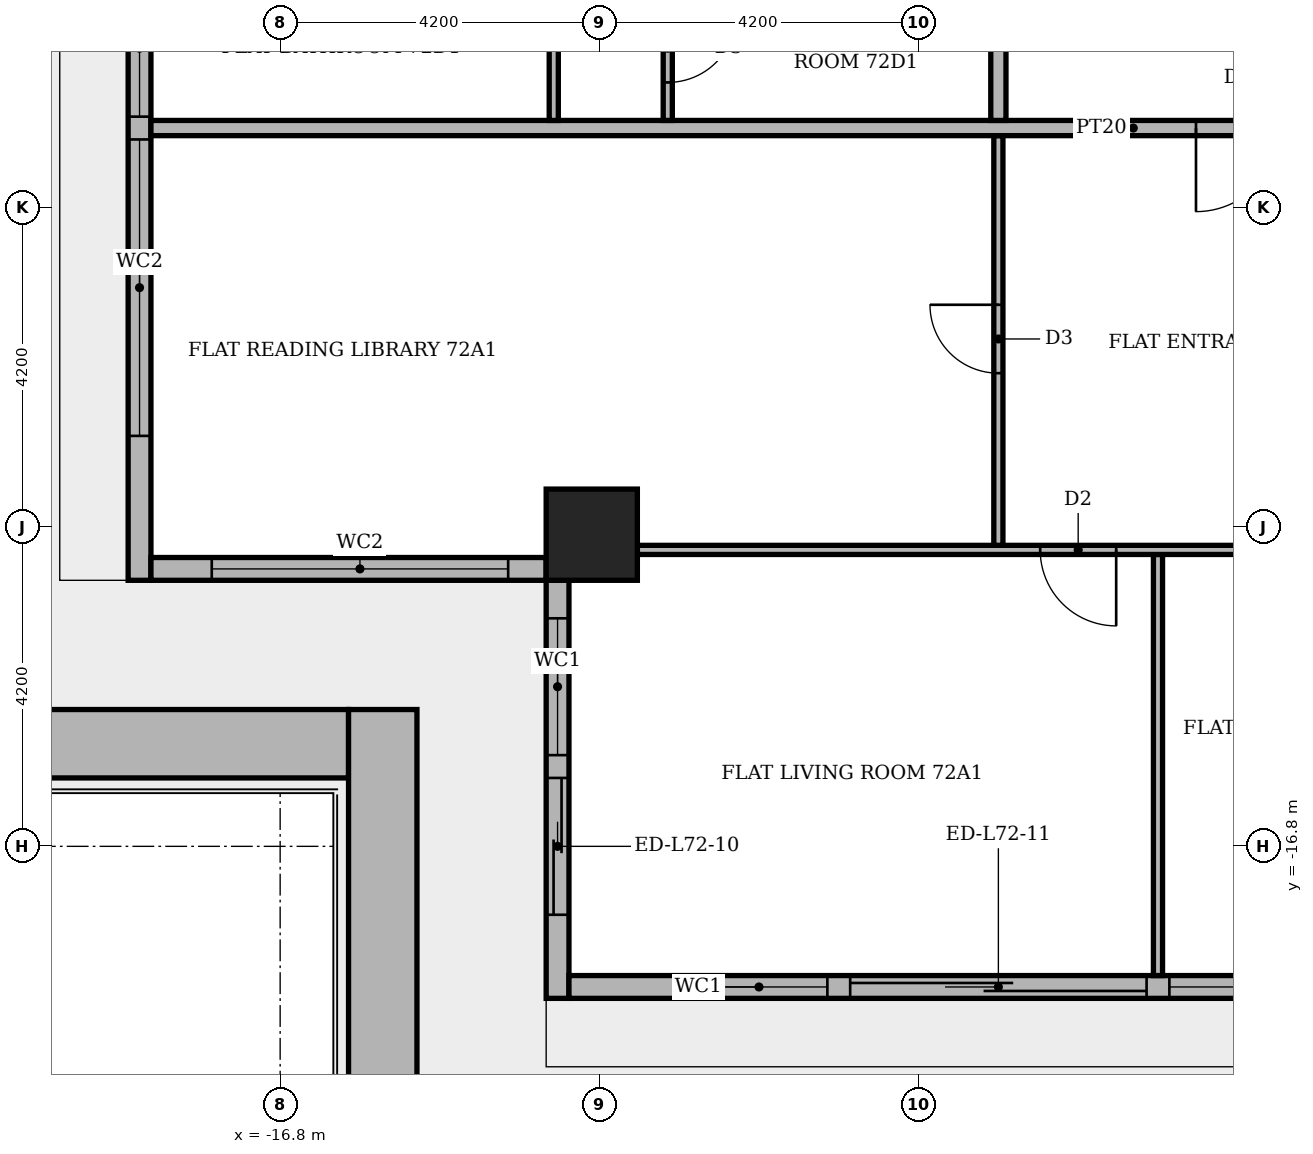
"""IFC4 building model, lengths in metres.
Left out: names, types, materials, properties, quantities, classifications, styles, units other than length and angle.
Written with IfcOpenShell. Run it as: python <this file> out.ifc"""

import sys

from ifc_helpers import new_model, si_unit, direction, frame, frame_2d, origin, origin_2d, place, context, subcontext, project, spatial, rectangle, extrude, element, fill, save


model = new_model("IFC4")
c1 = context("Model", 3, precision=1e-05, world=origin(), true_north=direction((0.0, 1.0)))
c2 = subcontext(c1, "Body", "Model", "MODEL_VIEW")
j1 = project(units=[si_unit("LENGTHUNIT", "METRE"), si_unit("PLANEANGLEUNIT", "RADIAN")], contexts=[c1])
p1 = place(None, origin())
s1 = spatial("IfcSite", under=j1, at=p1, CompositionType="ELEMENT")
p2 = place(p1, origin())
s2 = spatial("IfcBuilding", under=s1, at=p2, CompositionType="ELEMENT")
p3 = place(p2, frame((0.0, 0.0, 300.6)))
s3 = spatial("IfcBuildingStorey", under=s2, at=p3, CompositionType="ELEMENT", Elevation=300.6)
p4 = place(p3, frame((-12.7, -12.7, -0.35), z_axis=(0.0, 0.0, 1.0), x_axis=(1.0, 0.0, 0.0)))
e1 = element("IfcColumn", 1, at=p4, inside=s3, PredefinedType="COLUMN", context=c2, shape_type="SweptSolid", body=[
    extrude(rectangle(XDim=1.2, YDim=1.2, at=origin_2d()), origin(), (0.0, 0.0, 1.0), 4.25),
])
p5 = place(p3, frame((-18.65, 13.0, 0.0), z_axis=(0.0, 0.0, 1.0), x_axis=(0.0, -1.0, 0.0)))
e2 = element("IfcWall", 2, at=p5, inside=s3, PredefinedType="STANDARD", context=c2, shape_type="SweptSolid", body=[
    extrude(rectangle(XDim=26.3, YDim=0.3, at=frame_2d((13.15, 0.0))), origin(), (0.0, 0.0, 1.0), 3.55),
])
p6 = place(p5, frame((1.6, 0.0, 0.0)))
e3 = element("IfcOpeningElement", 3, at=p6, cuts=e2, PredefinedType="OPENING", context=c2, shape_type="SweptSolid", body=[
    extrude(rectangle(XDim=1.8, YDim=2.4, at=frame_2d((0.9, 1.2))), frame((0.0, 0.16, 0.0), z_axis=(0.0, -1.0, 0.0), x_axis=(1.0, 0.0, 0.0)), (0.0, 0.0, 1.0), 0.32),
])
p7 = place(p5, frame((3.7, 0.0, 0.6)))
e4 = element("IfcOpeningElement", 4, at=p7, cuts=e2, PredefinedType="OPENING", context=c2, shape_type="SweptSolid", body=[
    extrude(rectangle(XDim=1.8, YDim=2.4, at=frame_2d((0.9, 1.2))), frame((0.0, 0.16, 0.0), z_axis=(0.0, -1.0, 0.0), x_axis=(1.0, 0.0, 0.0)), (0.0, 0.0, 1.0), 0.32),
])
p8 = place(p5, frame((5.8, 0.0, 0.6)))
e5 = element("IfcOpeningElement", 5, at=p8, cuts=e2, PredefinedType="OPENING", context=c2, shape_type="SweptSolid", body=[
    extrude(rectangle(XDim=1.8, YDim=2.4, at=frame_2d((0.9, 1.2))), frame((0.0, 0.16, 0.0), z_axis=(0.0, -1.0, 0.0), x_axis=(1.0, 0.0, 0.0)), (0.0, 0.0, 1.0), 0.32),
])
p9 = place(p5, frame((7.9, 0.0, 0.0)))
e6 = element("IfcOpeningElement", 6, at=p9, cuts=e2, PredefinedType="OPENING", context=c2, shape_type="SweptSolid", body=[
    extrude(rectangle(XDim=1.8, YDim=2.4, at=frame_2d((0.9, 1.2))), frame((0.0, 0.16, 0.0), z_axis=(0.0, -1.0, 0.0), x_axis=(1.0, 0.0, 0.0)), (0.0, 0.0, 1.0), 0.32),
])
p10 = place(p5, frame((10.0, 0.0, 0.6)))
e7 = element("IfcOpeningElement", 7, at=p10, cuts=e2, PredefinedType="OPENING", context=c2, shape_type="SweptSolid", body=[
    extrude(rectangle(XDim=1.8, YDim=2.4, at=frame_2d((0.9, 1.2))), frame((0.0, 0.16, 0.0), z_axis=(0.0, -1.0, 0.0), x_axis=(1.0, 0.0, 0.0)), (0.0, 0.0, 1.0), 0.32),
])
p11 = place(p5, frame((12.1, 0.0, 0.6)))
e8 = element("IfcOpeningElement", 8, at=p11, cuts=e2, PredefinedType="OPENING", context=c2, shape_type="SweptSolid", body=[
    extrude(rectangle(XDim=1.8, YDim=2.4, at=frame_2d((0.9, 1.2))), frame((0.0, 0.16, 0.0), z_axis=(0.0, -1.0, 0.0), x_axis=(1.0, 0.0, 0.0)), (0.0, 0.0, 1.0), 0.32),
])
p12 = place(p5, frame((14.2, 0.0, 0.6)))
e9 = element("IfcOpeningElement", 9, at=p12, cuts=e2, PredefinedType="OPENING", context=c2, shape_type="SweptSolid", body=[
    extrude(rectangle(XDim=3.9, YDim=2.4, at=frame_2d((1.95, 1.2))), frame((0.0, 0.16, 0.0), z_axis=(0.0, -1.0, 0.0), x_axis=(1.0, 0.0, 0.0)), (0.0, 0.0, 1.0), 0.32),
])
p13 = place(p5, frame((18.4, 0.0, 0.6)))
e10 = element("IfcOpeningElement", 10, at=p13, cuts=e2, PredefinedType="OPENING", context=c2, shape_type="SweptSolid", body=[
    extrude(rectangle(XDim=1.8, YDim=2.4, at=frame_2d((0.9, 1.2))), frame((0.0, 0.16, 0.0), z_axis=(0.0, -1.0, 0.0), x_axis=(1.0, 0.0, 0.0)), (0.0, 0.0, 1.0), 0.32),
])
p14 = place(p5, frame((20.5, 0.0, 0.6)))
e11 = element("IfcOpeningElement", 11, at=p14, cuts=e2, PredefinedType="OPENING", context=c2, shape_type="SweptSolid", body=[
    extrude(rectangle(XDim=3.9, YDim=2.4, at=frame_2d((1.95, 1.2))), frame((0.0, 0.16, 0.0), z_axis=(0.0, -1.0, 0.0), x_axis=(1.0, 0.0, 0.0)), (0.0, 0.0, 1.0), 0.32),
])
p15 = place(p3, frame((-18.5, -13.15, 0.0), z_axis=(0.0, 0.0, 1.0), x_axis=(1.0, 0.0, 0.0)))
e12 = element("IfcWall", 12, at=p15, inside=s3, PredefinedType="STANDARD", context=c2, shape_type="SweptSolid", body=[
    extrude(rectangle(XDim=5.2, YDim=0.3, at=frame_2d((2.6, 0.0))), origin(), (0.0, 0.0, 1.0), 3.55),
])
p16 = place(p15, frame((0.8, 0.0, 0.6)))
e13 = element("IfcOpeningElement", 13, at=p16, cuts=e12, PredefinedType="OPENING", context=c2, shape_type="SweptSolid", body=[
    extrude(rectangle(XDim=3.9, YDim=2.4, at=frame_2d((1.95, 1.2))), frame((0.0, 0.16, 0.0), z_axis=(0.0, -1.0, 0.0), x_axis=(1.0, 0.0, 0.0)), (0.0, 0.0, 1.0), 0.32),
])
p17 = place(p3, frame((-13.15, -13.3, 0.0), z_axis=(0.0, 0.0, 1.0), x_axis=(0.0, -1.0, 0.0)))
e14 = element("IfcWall", 14, at=p17, inside=s3, PredefinedType="STANDARD", context=c2, shape_type="SweptSolid", body=[
    extrude(rectangle(XDim=5.5, YDim=0.3, at=frame_2d((2.75, 0.0))), origin(), (0.0, 0.0, 1.0), 3.55),
])
p18 = place(p17, frame((0.5, 0.0, 0.6)))
e15 = element("IfcOpeningElement", 15, at=p18, cuts=e14, PredefinedType="OPENING", context=c2, shape_type="SweptSolid", body=[
    extrude(rectangle(XDim=1.8, YDim=2.4, at=frame_2d((0.9, 1.2))), frame((0.0, 0.16, 0.0), z_axis=(0.0, -1.0, 0.0), x_axis=(1.0, 0.0, 0.0)), (0.0, 0.0, 1.0), 0.32),
])
p19 = place(p17, frame((2.6, 0.0, 0.0)))
e16 = element("IfcOpeningElement", 16, at=p19, cuts=e14, PredefinedType="OPENING", context=c2, shape_type="SweptSolid", body=[
    extrude(rectangle(XDim=1.8, YDim=2.4, at=frame_2d((0.9, 1.2))), frame((0.0, 0.16, 0.0), z_axis=(0.0, -1.0, 0.0), x_axis=(1.0, 0.0, 0.0)), (0.0, 0.0, 1.0), 0.32),
])
p20 = place(p3, frame((-13.0, -18.65, 0.0), z_axis=(0.0, 0.0, 1.0), x_axis=(1.0, 0.0, 0.0)))
e17 = element("IfcWall", 17, at=p20, inside=s3, PredefinedType="STANDARD", context=c2, shape_type="SweptSolid", body=[
    extrude(rectangle(XDim=26.3, YDim=0.3, at=frame_2d((13.15, 0.0))), origin(), (0.0, 0.0, 1.0), 3.55),
])
p21 = place(p20, frame((1.6, 0.0, 0.6)))
e18 = element("IfcOpeningElement", 18, at=p21, cuts=e17, PredefinedType="OPENING", context=c2, shape_type="SweptSolid", body=[
    extrude(rectangle(XDim=1.8, YDim=2.4, at=frame_2d((0.9, 1.2))), frame((0.0, 0.16, 0.0), z_axis=(0.0, -1.0, 0.0), x_axis=(1.0, 0.0, 0.0)), (0.0, 0.0, 1.0), 0.32),
])
p22 = place(p20, frame((3.7, 0.0, 0.0)))
e19 = element("IfcOpeningElement", 19, at=p22, cuts=e17, PredefinedType="OPENING", context=c2, shape_type="SweptSolid", body=[
    extrude(rectangle(XDim=3.9, YDim=2.4, at=frame_2d((1.95, 1.2))), frame((0.0, 0.16, 0.0), z_axis=(0.0, -1.0, 0.0), x_axis=(1.0, 0.0, 0.0)), (0.0, 0.0, 1.0), 0.32),
])
p23 = place(p20, frame((7.9, 0.0, 0.6)))
e20 = element("IfcOpeningElement", 20, at=p23, cuts=e17, PredefinedType="OPENING", context=c2, shape_type="SweptSolid", body=[
    extrude(rectangle(XDim=1.8, YDim=2.4, at=frame_2d((0.9, 1.2))), frame((0.0, 0.16, 0.0), z_axis=(0.0, -1.0, 0.0), x_axis=(1.0, 0.0, 0.0)), (0.0, 0.0, 1.0), 0.32),
])
p24 = place(p20, frame((10.0, 0.0, 0.0)))
e21 = element("IfcOpeningElement", 21, at=p24, cuts=e17, PredefinedType="OPENING", context=c2, shape_type="SweptSolid", body=[
    extrude(rectangle(XDim=1.8, YDim=2.4, at=frame_2d((0.9, 1.2))), frame((0.0, 0.16, 0.0), z_axis=(0.0, -1.0, 0.0), x_axis=(1.0, 0.0, 0.0)), (0.0, 0.0, 1.0), 0.32),
])
p25 = place(p20, frame((12.1, 0.0, 0.6)))
e22 = element("IfcOpeningElement", 22, at=p25, cuts=e17, PredefinedType="OPENING", context=c2, shape_type="SweptSolid", body=[
    extrude(rectangle(XDim=3.9, YDim=2.4, at=frame_2d((1.95, 1.2))), frame((0.0, 0.16, 0.0), z_axis=(0.0, -1.0, 0.0), x_axis=(1.0, 0.0, 0.0)), (0.0, 0.0, 1.0), 0.32),
])
p26 = place(p20, frame((16.3, 0.0, 0.6)))
e23 = element("IfcOpeningElement", 23, at=p26, cuts=e17, PredefinedType="OPENING", context=c2, shape_type="SweptSolid", body=[
    extrude(rectangle(XDim=1.8, YDim=2.4, at=frame_2d((0.9, 1.2))), frame((0.0, 0.16, 0.0), z_axis=(0.0, -1.0, 0.0), x_axis=(1.0, 0.0, 0.0)), (0.0, 0.0, 1.0), 0.32),
])
p27 = place(p20, frame((18.4, 0.0, 0.6)))
e24 = element("IfcOpeningElement", 24, at=p27, cuts=e17, PredefinedType="OPENING", context=c2, shape_type="SweptSolid", body=[
    extrude(rectangle(XDim=1.8, YDim=2.4, at=frame_2d((0.9, 1.2))), frame((0.0, 0.16, 0.0), z_axis=(0.0, -1.0, 0.0), x_axis=(1.0, 0.0, 0.0)), (0.0, 0.0, 1.0), 0.32),
])
p28 = place(p20, frame((20.5, 0.0, 0.6)))
e25 = element("IfcOpeningElement", 25, at=p28, cuts=e17, PredefinedType="OPENING", context=c2, shape_type="SweptSolid", body=[
    extrude(rectangle(XDim=3.9, YDim=2.4, at=frame_2d((1.95, 1.2))), frame((0.0, 0.16, 0.0), z_axis=(0.0, -1.0, 0.0), x_axis=(1.0, 0.0, 0.0)), (0.0, 0.0, 1.0), 0.32),
])
p29 = place(p3, frame((-20.5, -15.45, 0.0), z_axis=(0.0, 0.0, 1.0), x_axis=(1.0, 0.0, 0.0)))
e26 = element("IfcWall", 26, at=p29, inside=s3, PredefinedType="MOVABLE", context=c2, shape_type="SweptSolid", body=[
    extrude(rectangle(XDim=4.6, YDim=0.9, at=frame_2d((2.3, 0.0))), origin(), (0.0, 0.0, 1.0), 0.6),
])
p30 = place(p3, frame((-15.45, -21.4, 0.0), z_axis=(0.0, 0.0, 1.0), x_axis=(0.0, 1.0, 0.0)))
e27 = element("IfcWall", 27, at=p30, inside=s3, PredefinedType="MOVABLE", context=c2, shape_type="SweptSolid", body=[
    extrude(rectangle(XDim=6.4, YDim=0.9, at=frame_2d((3.2, 0.0))), origin(), (0.0, 0.0, 1.0), 0.6),
])
p31 = place(p3, frame((-5.25, -18.5, 0.0), z_axis=(0.0, 0.0, 1.0), x_axis=(0.0, 1.0, 0.0)))
e28 = element("IfcWall", 28, at=p31, inside=s3, PredefinedType="PARTITIONING", context=c2, shape_type="SweptSolid", body=[
    extrude(rectangle(XDim=5.54, YDim=0.12, at=frame_2d((2.77, 0.0))), origin(), (0.0, 0.0, 1.0), 3.55),
])
p32 = place(p3, frame((-12.1, -12.9, 0.0), z_axis=(0.0, 0.0, 1.0), x_axis=(1.0, 0.0, 0.0)))
e29 = element("IfcWall", 29, at=p32, inside=s3, PredefinedType="PARTITIONING", context=c2, shape_type="SweptSolid", body=[
    extrude(rectangle(XDim=19.35, YDim=0.12, at=frame_2d((9.675, 0.0))), origin(), (0.0, 0.0, 1.0), 3.55),
])
p33 = place(p32, frame((5.3, 0.0, 0.0)))
e30 = element("IfcOpeningElement", 30, at=p33, cuts=e29, PredefinedType="OPENING", context=c2, shape_type="SweptSolid", body=[
    extrude(rectangle(XDim=1.0, YDim=2.1, at=frame_2d((0.5, 1.05))), frame((0.0, 0.07, 0.0), z_axis=(0.0, -1.0, 0.0), x_axis=(1.0, 0.0, 0.0)), (0.0, 0.0, 1.0), 0.14),
])
p34 = place(p32, frame((10.6, 0.0, 0.0)))
e31 = element("IfcOpeningElement", 31, at=p34, cuts=e29, PredefinedType="OPENING", context=c2, shape_type="SweptSolid", body=[
    extrude(rectangle(XDim=0.9, YDim=2.1, at=frame_2d((0.45, 1.05))), frame((0.0, 0.07, 0.0), z_axis=(0.0, -1.0, 0.0), x_axis=(1.0, 0.0, 0.0)), (0.0, 0.0, 1.0), 0.14),
])
p35 = place(p3, frame((-7.35, -12.84, 0.0), z_axis=(0.0, 0.0, 1.0), x_axis=(0.0, 1.0, 0.0)))
e32 = element("IfcWall", 32, at=p35, inside=s3, PredefinedType="PARTITIONING", context=c2, shape_type="SweptSolid", body=[
    extrude(rectangle(XDim=5.39, YDim=0.12, at=frame_2d((2.695, 0.0))), origin(), (0.0, 0.0, 1.0), 3.55),
])
p36 = place(p35, frame((2.265, 0.0, 0.0)))
e33 = element("IfcOpeningElement", 33, at=p36, cuts=e32, PredefinedType="OPENING", context=c2, shape_type="SweptSolid", body=[
    extrude(rectangle(XDim=0.9, YDim=2.1, at=frame_2d((0.45, 1.05))), frame((0.0, 0.07, 0.0), z_axis=(0.0, -1.0, 0.0), x_axis=(1.0, 0.0, 0.0)), (0.0, 0.0, 1.0), 0.14),
])
p37 = place(p3, frame((-18.5, -7.35, 0.0), z_axis=(0.0, 0.0, 1.0), x_axis=(1.0, 0.0, 0.0)))
e34 = element("IfcWall", 34, at=p37, inside=s3, PredefinedType="PARTITIONING", context=c2, shape_type="SweptSolid", body=[
    extrude(rectangle(XDim=25.85, YDim=0.2, at=frame_2d((12.925, 0.0))), origin(), (0.0, 0.0, 1.0), 3.55),
])
p38 = place(p37, frame((13.75, 0.0, 0.0)))
e35 = element("IfcOpeningElement", 35, at=p38, cuts=e34, PredefinedType="OPENING", context=c2, shape_type="SweptSolid", body=[
    extrude(rectangle(XDim=1.1, YDim=2.4, at=frame_2d((0.55, 1.2))), frame((0.0, 0.11, 0.0), z_axis=(0.0, -1.0, 0.0), x_axis=(1.0, 0.0, 0.0)), (0.0, 0.0, 1.0), 0.22),
])
p39 = place(p3, frame((-13.2, -7.25, 0.0), z_axis=(0.0, 0.0, 1.0), x_axis=(0.0, 1.0, 0.0)))
e36 = element("IfcWall", 36, at=p39, inside=s3, PredefinedType="PARTITIONING", context=c2, shape_type="SweptSolid", body=[
    extrude(rectangle(XDim=1.94, YDim=0.12, at=frame_2d((0.97, 0.0))), origin(), (0.0, 0.0, 1.0), 3.55),
])
p40 = place(p3, frame((-11.7, -7.25, 0.0), z_axis=(0.0, 0.0, 1.0), x_axis=(0.0, 1.0, 0.0)))
e37 = element("IfcWall", 37, at=p40, inside=s3, PredefinedType="PARTITIONING", context=c2, shape_type="SweptSolid", body=[
    extrude(rectangle(XDim=1.94, YDim=0.12, at=frame_2d((0.97, 0.0))), origin(), (0.0, 0.0, 1.0), 3.55),
])
p41 = place(p40, frame((0.5, 0.0, 0.0)))
e38 = element("IfcOpeningElement", 38, at=p41, cuts=e37, PredefinedType="OPENING", context=c2, shape_type="SweptSolid", body=[
    extrude(rectangle(XDim=0.9, YDim=2.1, at=frame_2d((0.45, 1.05))), frame((0.0, 0.07, 0.0), z_axis=(0.0, -1.0, 0.0), x_axis=(1.0, 0.0, 0.0)), (0.0, 0.0, 1.0), 0.14),
])
p42 = place(p3, frame((-7.35, -7.25, 0.0), z_axis=(0.0, 0.0, 1.0), x_axis=(0.0, 1.0, 0.0)))
e39 = element("IfcWall", 39, at=p42, inside=s3, PredefinedType="PARTITIONING", context=c2, shape_type="SweptSolid", body=[
    extrude(rectangle(XDim=14.5, YDim=0.2, at=frame_2d((7.25, 0.0))), origin(), (0.0, 0.0, 1.0), 3.55),
])
p43 = place(p42, frame((11.95, 0.0, 0.0)))
e40 = element("IfcOpeningElement", 40, at=p43, cuts=e39, PredefinedType="OPENING", context=c2, shape_type="SweptSolid", body=[
    extrude(rectangle(XDim=1.1, YDim=2.4, at=frame_2d((0.55, 1.2))), frame((0.0, 0.11, 0.0), z_axis=(0.0, -1.0, 0.0), x_axis=(1.0, 0.0, 0.0)), (0.0, 0.0, 1.0), 0.22),
])
p44 = place(p13, origin())
e41 = element("IfcWindow", 41, at=p44, inside=s3, PartitioningType="SINGLE_PANEL", PredefinedType="WINDOW", context=c2, shape_type="SweptSolid", body=[
    extrude(rectangle(XDim=1.8, YDim=2.4, at=frame_2d((0.9, 1.2))), frame((0.0, 0.03, 0.0), z_axis=(0.0, -1.0, 0.0), x_axis=(1.0, 0.0, 0.0)), (0.0, 0.0, 1.0), 0.06),
])
fill(e10, e41)
p45 = place(p14, origin())
e42 = element("IfcWindow", 42, at=p45, inside=s3, PartitioningType="SINGLE_PANEL", PredefinedType="WINDOW", context=c2, shape_type="SweptSolid", body=[
    extrude(rectangle(XDim=3.9, YDim=2.4, at=frame_2d((1.95, 1.2))), frame((0.0, 0.03, 0.0), z_axis=(0.0, -1.0, 0.0), x_axis=(1.0, 0.0, 0.0)), (0.0, 0.0, 1.0), 0.06),
])
fill(e11, e42)
p46 = place(p16, origin())
e43 = element("IfcWindow", 43, at=p46, inside=s3, PartitioningType="SINGLE_PANEL", PredefinedType="WINDOW", context=c2, shape_type="SweptSolid", body=[
    extrude(rectangle(XDim=3.9, YDim=2.4, at=frame_2d((1.95, 1.2))), frame((0.0, 0.03, 0.0), z_axis=(0.0, -1.0, 0.0), x_axis=(1.0, 0.0, 0.0)), (0.0, 0.0, 1.0), 0.06),
])
fill(e13, e43)
p47 = place(p18, origin())
e44 = element("IfcWindow", 44, at=p47, inside=s3, PartitioningType="SINGLE_PANEL", PredefinedType="WINDOW", context=c2, shape_type="SweptSolid", body=[
    extrude(rectangle(XDim=1.8, YDim=2.4, at=frame_2d((0.9, 1.2))), frame((0.0, 0.03, 0.0), z_axis=(0.0, -1.0, 0.0), x_axis=(1.0, 0.0, 0.0)), (0.0, 0.0, 1.0), 0.06),
])
fill(e15, e44)
p48 = place(p19, origin())
e45 = element("IfcDoor", 45, at=p48, inside=s3, OperationType="SLIDING_TO_LEFT", PredefinedType="DOOR", context=c2, shape_type="SweptSolid", body=[
    extrude(rectangle(XDim=1.8, YDim=2.4, at=frame_2d((0.9, 1.2))), frame((0.0, 0.025, 0.0), z_axis=(0.0, -1.0, 0.0), x_axis=(1.0, 0.0, 0.0)), (0.0, 0.0, 1.0), 0.05),
])
fill(e16, e45)
p49 = place(p21, origin())
e46 = element("IfcWindow", 46, at=p49, inside=s3, PartitioningType="SINGLE_PANEL", PredefinedType="WINDOW", context=c2, shape_type="SweptSolid", body=[
    extrude(rectangle(XDim=1.8, YDim=2.4, at=frame_2d((0.9, 1.2))), frame((0.0, 0.03, 0.0), z_axis=(0.0, -1.0, 0.0), x_axis=(1.0, 0.0, 0.0)), (0.0, 0.0, 1.0), 0.06),
])
fill(e18, e46)
p50 = place(p22, origin())
e47 = element("IfcDoor", 47, at=p50, inside=s3, OperationType="SLIDING_TO_LEFT", PredefinedType="DOOR", context=c2, shape_type="SweptSolid", body=[
    extrude(rectangle(XDim=3.9, YDim=2.4, at=frame_2d((1.95, 1.2))), frame((0.0, 0.025, 0.0), z_axis=(0.0, -1.0, 0.0), x_axis=(1.0, 0.0, 0.0)), (0.0, 0.0, 1.0), 0.05),
])
fill(e19, e47)
p51 = place(p23, origin())
e48 = element("IfcWindow", 48, at=p51, inside=s3, PartitioningType="SINGLE_PANEL", PredefinedType="WINDOW", context=c2, shape_type="SweptSolid", body=[
    extrude(rectangle(XDim=1.8, YDim=2.4, at=frame_2d((0.9, 1.2))), frame((0.0, 0.03, 0.0), z_axis=(0.0, -1.0, 0.0), x_axis=(1.0, 0.0, 0.0)), (0.0, 0.0, 1.0), 0.06),
])
fill(e20, e48)
p52 = place(p38, frame((1.1, 0.0, 0.0), z_axis=(0.0, 0.0, 1.0), x_axis=(-1.0, 0.0, 0.0)))
e49 = element("IfcDoor", 49, at=p52, inside=s3, OperationType="SINGLE_SWING_LEFT", PredefinedType="DOOR", context=c2, shape_type="SweptSolid", body=[
    extrude(rectangle(XDim=1.1, YDim=2.4, at=frame_2d((0.55, 1.2))), frame((0.0, 0.025, 0.0), z_axis=(0.0, -1.0, 0.0), x_axis=(1.0, 0.0, 0.0)), (0.0, 0.0, 1.0), 0.05),
])
fill(e35, e49)
p53 = place(p36, origin())
e50 = element("IfcDoor", 50, at=p53, inside=s3, OperationType="SINGLE_SWING_RIGHT", PredefinedType="DOOR", context=c2, shape_type="SweptSolid", body=[
    extrude(rectangle(XDim=0.9, YDim=2.1, at=frame_2d((0.45, 1.05))), frame((0.0, 0.025, 0.0), z_axis=(0.0, -1.0, 0.0), x_axis=(1.0, 0.0, 0.0)), (0.0, 0.0, 1.0), 0.05),
])
fill(e33, e50)
p54 = place(p33, frame((1.0, 0.0, 0.0), z_axis=(0.0, 0.0, 1.0), x_axis=(-1.0, 0.0, 0.0)))
e51 = element("IfcDoor", 51, at=p54, inside=s3, OperationType="SINGLE_SWING_RIGHT", PredefinedType="DOOR", context=c2, shape_type="SweptSolid", body=[
    extrude(rectangle(XDim=1.0, YDim=2.1, at=frame_2d((0.5, 1.05))), frame((0.0, 0.025, 0.0), z_axis=(0.0, -1.0, 0.0), x_axis=(1.0, 0.0, 0.0)), (0.0, 0.0, 1.0), 0.05),
])
fill(e30, e51)
p55 = place(p41, frame((0.9, 0.0, 0.0), z_axis=(0.0, 0.0, 1.0), x_axis=(-1.0, 0.0, 0.0)))
e52 = element("IfcDoor", 52, at=p55, inside=s3, OperationType="SINGLE_SWING_RIGHT", PredefinedType="DOOR", context=c2, shape_type="SweptSolid", body=[
    extrude(rectangle(XDim=0.9, YDim=2.1, at=frame_2d((0.45, 1.05))), frame((0.0, 0.025, 0.0), z_axis=(0.0, -1.0, 0.0), x_axis=(1.0, 0.0, 0.0)), (0.0, 0.0, 1.0), 0.05),
])
fill(e38, e52)
save(model, sys.argv[1])
